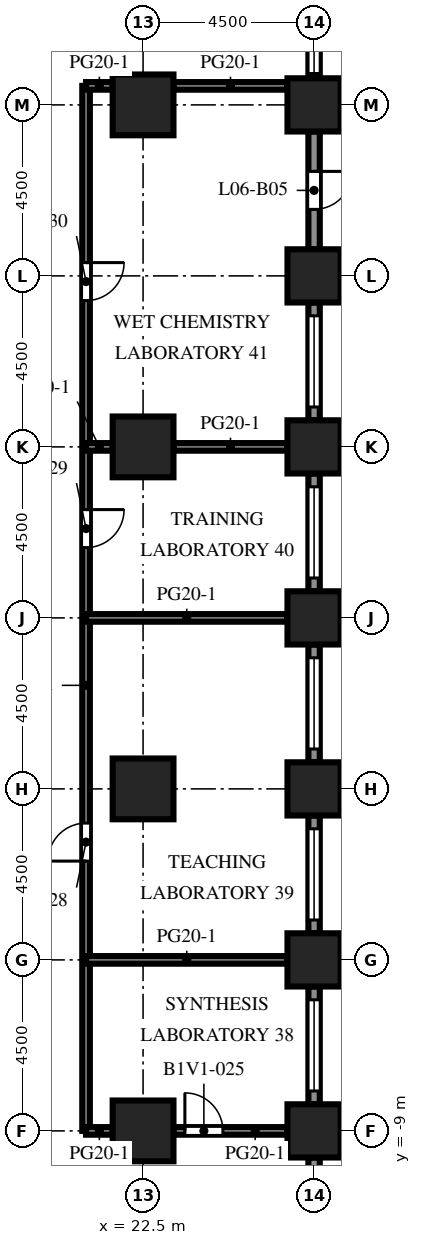
"""IFC4 building model, lengths in metres.
Left out: names, types, materials, properties, quantities, classifications, styles, units other than length and angle.
Written with IfcOpenShell. Run it as: python <this file> out.ifc"""

import sys

from ifc_helpers import new_model, si_unit, direction, frame, frame_2d, origin, origin_2d, place, context, subcontext, project, spatial, rectangle, extrude, element, fill, save


model = new_model("IFC4")
c1 = context("Model", 3, precision=1e-05, world=origin(), true_north=direction((0.0, 1.0)))
c2 = subcontext(c1, "Body", "Model", "MODEL_VIEW")
j1 = project(units=[si_unit("LENGTHUNIT", "METRE"), si_unit("PLANEANGLEUNIT", "RADIAN")], contexts=[c1])
p1 = place(None, origin())
s1 = spatial("IfcSite", under=j1, at=p1, CompositionType="ELEMENT")
p2 = place(p1, origin())
s2 = spatial("IfcBuilding", under=s1, at=p2, CompositionType="ELEMENT")
p3 = place(p2, frame((0.0, 0.0, 27.7)))
s3 = spatial("IfcBuildingStorey", under=s2, at=p3, CompositionType="ELEMENT", Elevation=27.7)
for number, where, z_axis, x_axis in (
    (1, (27.0, -9.0, 0.0), (0.0, 0.0, 1.0), (1.0, 0.0, 0.0)),
    (2, (27.0, -4.5, 0.0), (0.0, 0.0, 1.0), (1.0, 0.0, 0.0)),
    (3, (27.0, 0.0, 0.0), (0.0, 0.0, 1.0), (1.0, 0.0, 0.0)),
    (4, (27.0, 4.5, 0.0), (0.0, 0.0, 1.0), (1.0, 0.0, 0.0)),
    (5, (27.0, 9.0, 0.0), (0.0, 0.0, 1.0), (1.0, 0.0, 0.0)),
    (6, (27.0, 13.5, 0.0), (0.0, 0.0, 1.0), (1.0, 0.0, 0.0)),
    (7, (27.0, 18.0, 0.0), (0.0, 0.0, 1.0), (1.0, 0.0, 0.0)),
):
    element("IfcColumn", number, at=place(p3, frame(where, z_axis=z_axis, x_axis=x_axis)), inside=s3, PredefinedType="COLUMN", context=c2, shape_type="SweptSolid", body=[
        extrude(rectangle(XDim=1.4, YDim=1.4, at=origin_2d()), origin(), (0.0, 0.0, 1.0), 4.1),
    ])
for number, where, z_axis, x_axis in (
    (8, (22.5, -9.0, 0.0), (0.0, 0.0, 1.0), (1.0, 0.0, 0.0)),
    (9, (22.5, 0.0, 0.0), (0.0, 0.0, 1.0), (1.0, 0.0, 0.0)),
    (10, (22.5, 9.0, 0.0), (0.0, 0.0, 1.0), (1.0, 0.0, 0.0)),
    (11, (22.5, 18.0, 0.0), (0.0, 0.0, 1.0), (1.0, 0.0, 0.0)),
):
    element("IfcColumn", number, at=place(p3, frame(where, z_axis=z_axis, x_axis=x_axis)), inside=s3, PredefinedType="COLUMN", context=c2, shape_type="SweptSolid", body=[
        extrude(rectangle(XDim=1.6, YDim=1.6, at=origin_2d()), origin(), (0.0, 0.0, 1.0), 4.1),
    ])
p4 = place(p3, frame((27.0, -9.7, 0.0), z_axis=(0.0, 0.0, 1.0), x_axis=(0.0, -1.0, 0.0)))
e12 = element("IfcWall", 12, at=p4, inside=s3, PredefinedType="SOLIDWALL", context=c2, shape_type="SweptSolid", body=[
    extrude(rectangle(XDim=3.1, YDim=0.3, at=frame_2d((1.55, 0.0))), origin(), (0.0, 0.0, 1.0), 2.75),
])
p5 = place(p4, frame((0.475, 0.0, 0.8)))
e13 = element("IfcOpeningElement", 13, at=p5, cuts=e12, PredefinedType="OPENING", context=c2, shape_type="SweptSolid", body=[
    extrude(rectangle(XDim=1.2, YDim=1.7, at=frame_2d((0.6, 0.85))), frame((0.0, 0.16, 0.0), z_axis=(0.0, -1.0, 0.0), x_axis=(1.0, 0.0, 0.0)), (0.0, 0.0, 1.0), 0.32),
])
p6 = place(p3, frame((27.0, -5.2, 0.0), z_axis=(0.0, 0.0, 1.0), x_axis=(0.0, -1.0, 0.0)))
e14 = element("IfcWall", 14, at=p6, inside=s3, PredefinedType="SOLIDWALL", context=c2, shape_type="SweptSolid", body=[
    extrude(rectangle(XDim=3.1, YDim=0.3, at=frame_2d((1.55, 0.0))), origin(), (0.0, 0.0, 1.0), 2.75),
])
p7 = place(p6, frame((0.35, 0.0, 0.8)))
e15 = element("IfcOpeningElement", 15, at=p7, cuts=e14, PredefinedType="OPENING", context=c2, shape_type="SweptSolid", body=[
    extrude(rectangle(XDim=2.4, YDim=1.7, at=frame_2d((1.2, 0.85))), frame((0.0, 0.16, 0.0), z_axis=(0.0, -1.0, 0.0), x_axis=(1.0, 0.0, 0.0)), (0.0, 0.0, 1.0), 0.32),
])
p8 = place(p3, frame((27.0, -0.7, 0.0), z_axis=(0.0, 0.0, 1.0), x_axis=(0.0, -1.0, 0.0)))
e16 = element("IfcWall", 16, at=p8, inside=s3, PredefinedType="SOLIDWALL", context=c2, shape_type="SweptSolid", body=[
    extrude(rectangle(XDim=3.1, YDim=0.3, at=frame_2d((1.55, 0.0))), origin(), (0.0, 0.0, 1.0), 2.75),
])
p9 = place(p8, frame((0.35, 0.0, 0.8)))
e17 = element("IfcOpeningElement", 17, at=p9, cuts=e16, PredefinedType="OPENING", context=c2, shape_type="SweptSolid", body=[
    extrude(rectangle(XDim=2.4, YDim=1.7, at=frame_2d((1.2, 0.85))), frame((0.0, 0.16, 0.0), z_axis=(0.0, -1.0, 0.0), x_axis=(1.0, 0.0, 0.0)), (0.0, 0.0, 1.0), 0.32),
])
p10 = place(p3, frame((27.0, 3.8, 0.0), z_axis=(0.0, 0.0, 1.0), x_axis=(0.0, -1.0, 0.0)))
e18 = element("IfcWall", 18, at=p10, inside=s3, PredefinedType="SOLIDWALL", context=c2, shape_type="SweptSolid", body=[
    extrude(rectangle(XDim=3.1, YDim=0.3, at=frame_2d((1.55, 0.0))), origin(), (0.0, 0.0, 1.0), 2.75),
])
p11 = place(p10, frame((0.35, 0.0, 0.8)))
e19 = element("IfcOpeningElement", 19, at=p11, cuts=e18, PredefinedType="OPENING", context=c2, shape_type="SweptSolid", body=[
    extrude(rectangle(XDim=2.4, YDim=1.7, at=frame_2d((1.2, 0.85))), frame((0.0, 0.16, 0.0), z_axis=(0.0, -1.0, 0.0), x_axis=(1.0, 0.0, 0.0)), (0.0, 0.0, 1.0), 0.32),
])
p12 = place(p3, frame((27.0, 8.3, 0.0), z_axis=(0.0, 0.0, 1.0), x_axis=(0.0, -1.0, 0.0)))
e20 = element("IfcWall", 20, at=p12, inside=s3, PredefinedType="SOLIDWALL", context=c2, shape_type="SweptSolid", body=[
    extrude(rectangle(XDim=3.1, YDim=0.3, at=frame_2d((1.55, 0.0))), origin(), (0.0, 0.0, 1.0), 2.75),
])
p13 = place(p12, frame((0.35, 0.0, 0.8)))
e21 = element("IfcOpeningElement", 21, at=p13, cuts=e20, PredefinedType="OPENING", context=c2, shape_type="SweptSolid", body=[
    extrude(rectangle(XDim=2.4, YDim=1.7, at=frame_2d((1.2, 0.85))), frame((0.0, 0.16, 0.0), z_axis=(0.0, -1.0, 0.0), x_axis=(1.0, 0.0, 0.0)), (0.0, 0.0, 1.0), 0.32),
])
p14 = place(p3, frame((27.0, 12.8, 0.0), z_axis=(0.0, 0.0, 1.0), x_axis=(0.0, -1.0, 0.0)))
e22 = element("IfcWall", 22, at=p14, inside=s3, PredefinedType="SOLIDWALL", context=c2, shape_type="SweptSolid", body=[
    extrude(rectangle(XDim=3.1, YDim=0.3, at=frame_2d((1.55, 0.0))), origin(), (0.0, 0.0, 1.0), 2.75),
])
p15 = place(p14, frame((0.35, 0.0, 0.8)))
e23 = element("IfcOpeningElement", 23, at=p15, cuts=e22, PredefinedType="OPENING", context=c2, shape_type="SweptSolid", body=[
    extrude(rectangle(XDim=2.4, YDim=1.7, at=frame_2d((1.2, 0.85))), frame((0.0, 0.16, 0.0), z_axis=(0.0, -1.0, 0.0), x_axis=(1.0, 0.0, 0.0)), (0.0, 0.0, 1.0), 0.32),
])
p16 = place(p3, frame((27.0, 17.3, 0.0), z_axis=(0.0, 0.0, 1.0), x_axis=(0.0, -1.0, 0.0)))
e24 = element("IfcWall", 24, at=p16, inside=s3, PredefinedType="SOLIDWALL", context=c2, shape_type="SweptSolid", body=[
    extrude(rectangle(XDim=3.1, YDim=0.3, at=frame_2d((1.55, 0.0))), origin(), (0.0, 0.0, 1.0), 2.75),
])
p17 = place(p16, frame((1.05, 0.0, 0.0)))
e25 = element("IfcOpeningElement", 25, at=p17, cuts=e24, PredefinedType="OPENING", context=c2, shape_type="SweptSolid", body=[
    extrude(rectangle(XDim=1.0, YDim=2.2, at=frame_2d((0.5, 1.1))), frame((0.0, 0.16, 0.0), z_axis=(0.0, -1.0, 0.0), x_axis=(1.0, 0.0, 0.0)), (0.0, 0.0, 1.0), 0.32),
])
p18 = place(p3, frame((27.0, 21.8, 0.0), z_axis=(0.0, 0.0, 1.0), x_axis=(0.0, -1.0, 0.0)))
e26 = element("IfcWall", 26, at=p18, inside=s3, PredefinedType="SOLIDWALL", context=c2, shape_type="SweptSolid", body=[
    extrude(rectangle(XDim=3.1, YDim=0.3, at=frame_2d((1.55, 0.0))), origin(), (0.0, 0.0, 1.0), 2.75),
])
p19 = place(p18, frame((0.575, 0.0, 0.8)))
e27 = element("IfcOpeningElement", 27, at=p19, cuts=e26, PredefinedType="OPENING", context=c2, shape_type="SweptSolid", body=[
    extrude(rectangle(XDim=2.4, YDim=1.7, at=frame_2d((1.2, 0.85))), frame((0.0, 0.16, 0.0), z_axis=(0.0, -1.0, 0.0), x_axis=(1.0, 0.0, 0.0)), (0.0, 0.0, 1.0), 0.32),
])
p20 = place(p3, frame((21.0, 18.5, 0.0), z_axis=(0.0, 0.0, 1.0), x_axis=(0.0, -1.0, 0.0)))
e28 = element("IfcWall", 28, at=p20, inside=s3, PredefinedType="PARTITIONING", context=c2, shape_type="SweptSolid", body=[
    extrude(rectangle(XDim=27.5, YDim=0.2, at=frame_2d((13.75, 0.0))), origin(), (0.0, 0.0, 1.0), 3.65),
])
p21 = place(p20, frame((19.4, 0.0, 0.0)))
e29 = element("IfcOpeningElement", 29, at=p21, cuts=e28, PredefinedType="OPENING", context=c2, shape_type="SweptSolid", body=[
    extrude(rectangle(XDim=1.0, YDim=2.1, at=frame_2d((0.5, 1.05))), frame((0.0, 0.11, 0.0), z_axis=(0.0, -1.0, 0.0), x_axis=(1.0, 0.0, 0.0)), (0.0, 0.0, 1.0), 0.22),
])
p22 = place(p20, frame((11.15, 0.0, 0.0)))
e30 = element("IfcOpeningElement", 30, at=p22, cuts=e28, PredefinedType="OPENING", context=c2, shape_type="SweptSolid", body=[
    extrude(rectangle(XDim=1.0, YDim=2.1, at=frame_2d((0.5, 1.05))), frame((0.0, 0.11, 0.0), z_axis=(0.0, -1.0, 0.0), x_axis=(1.0, 0.0, 0.0)), (0.0, 0.0, 1.0), 0.22),
])
p23 = place(p20, frame((4.65, 0.0, 0.0)))
e31 = element("IfcOpeningElement", 31, at=p23, cuts=e28, PredefinedType="OPENING", context=c2, shape_type="SweptSolid", body=[
    extrude(rectangle(XDim=1.0, YDim=2.1, at=frame_2d((0.5, 1.05))), frame((0.0, 0.11, 0.0), z_axis=(0.0, -1.0, 0.0), x_axis=(1.0, 0.0, 0.0)), (0.0, 0.0, 1.0), 0.22),
])
p24 = place(p3, frame((21.0, -9.0, 0.0), z_axis=(0.0, 0.0, 1.0), x_axis=(1.0, 0.0, 0.0)))
e32 = element("IfcWall", 32, at=p24, inside=s3, PredefinedType="PARTITIONING", context=c2, shape_type="SweptSolid", body=[
    extrude(rectangle(XDim=0.7, YDim=0.2, at=frame_2d((0.35, 0.0))), origin(), (0.0, 0.0, 1.0), 3.65),
])
p25 = place(p3, frame((23.3, -9.0, 0.0), z_axis=(0.0, 0.0, 1.0), x_axis=(1.0, 0.0, 0.0)))
e33 = element("IfcWall", 33, at=p25, inside=s3, PredefinedType="PARTITIONING", context=c2, shape_type="SweptSolid", body=[
    extrude(rectangle(XDim=3.0, YDim=0.2, at=frame_2d((1.5, 0.0))), origin(), (0.0, 0.0, 1.0), 3.65),
])
p26 = place(p25, frame((0.3, 0.0, 0.0)))
e34 = element("IfcOpeningElement", 34, at=p26, cuts=e33, PredefinedType="OPENING", context=c2, shape_type="SweptSolid", body=[
    extrude(rectangle(XDim=1.0, YDim=2.1, at=frame_2d((0.5, 1.05))), frame((0.0, 0.11, 0.0), z_axis=(0.0, -1.0, 0.0), x_axis=(1.0, 0.0, 0.0)), (0.0, 0.0, 1.0), 0.22),
])
for number, where, z_axis, x_axis in (
    (35, (21.0, -4.5, 0.0), (0.0, 0.0, 1.0), (1.0, 0.0, 0.0)),
    (36, (21.0, 4.5, 0.0), (0.0, 0.0, 1.0), (1.0, 0.0, 0.0)),
):
    element("IfcWall", number, at=place(p3, frame(where, z_axis=z_axis, x_axis=x_axis)), inside=s3, PredefinedType="PARTITIONING", context=c2, shape_type="SweptSolid", body=[
        extrude(rectangle(XDim=5.3, YDim=0.2, at=frame_2d((2.65, 0.0))), origin(), (0.0, 0.0, 1.0), 3.65),
    ])
p27 = place(p3, frame((21.0, 9.0, 0.0), z_axis=(0.0, 0.0, 1.0), x_axis=(1.0, 0.0, 0.0)))
e37 = element("IfcWall", 37, at=p27, inside=s3, PredefinedType="PARTITIONING", context=c2, shape_type="SweptSolid", body=[
    extrude(rectangle(XDim=0.7, YDim=0.2, at=frame_2d((0.35, 0.0))), origin(), (0.0, 0.0, 1.0), 3.65),
])
p28 = place(p3, frame((23.3, 9.0, 0.0), z_axis=(0.0, 0.0, 1.0), x_axis=(1.0, 0.0, 0.0)))
e38 = element("IfcWall", 38, at=p28, inside=s3, PredefinedType="PARTITIONING", context=c2, shape_type="SweptSolid", body=[
    extrude(rectangle(XDim=3.0, YDim=0.2, at=frame_2d((1.5, 0.0))), origin(), (0.0, 0.0, 1.0), 3.65),
])
p29 = place(p3, frame((21.0, 18.5, 0.0), z_axis=(0.0, 0.0, 1.0), x_axis=(1.0, 0.0, 0.0)))
e39 = element("IfcWall", 39, at=p29, inside=s3, PredefinedType="PARTITIONING", context=c2, shape_type="SweptSolid", body=[
    extrude(rectangle(XDim=0.7, YDim=0.2, at=frame_2d((0.35, 0.0))), origin(), (0.0, 0.0, 1.0), 3.65),
])
p30 = place(p3, frame((23.3, 18.5, 0.0), z_axis=(0.0, 0.0, 1.0), x_axis=(1.0, 0.0, 0.0)))
e40 = element("IfcWall", 40, at=p30, inside=s3, PredefinedType="PARTITIONING", context=c2, shape_type="SweptSolid", body=[
    extrude(rectangle(XDim=3.0, YDim=0.2, at=frame_2d((1.5, 0.0))), origin(), (0.0, 0.0, 1.0), 3.65),
])
p31 = place(p7, origin())
e41 = element("IfcWindow", 41, at=p31, inside=s3, PartitioningType="SINGLE_PANEL", PredefinedType="WINDOW", context=c2, shape_type="SweptSolid", body=[
    extrude(rectangle(XDim=2.4, YDim=1.7, at=frame_2d((1.2, 0.85))), frame((0.0, 0.03, 0.0), z_axis=(0.0, -1.0, 0.0), x_axis=(1.0, 0.0, 0.0)), (0.0, 0.0, 1.0), 0.06),
])
fill(e15, e41)
p32 = place(p9, origin())
e42 = element("IfcWindow", 42, at=p32, inside=s3, PartitioningType="SINGLE_PANEL", PredefinedType="WINDOW", context=c2, shape_type="SweptSolid", body=[
    extrude(rectangle(XDim=2.4, YDim=1.7, at=frame_2d((1.2, 0.85))), frame((0.0, 0.03, 0.0), z_axis=(0.0, -1.0, 0.0), x_axis=(1.0, 0.0, 0.0)), (0.0, 0.0, 1.0), 0.06),
])
fill(e17, e42)
p33 = place(p11, origin())
e43 = element("IfcWindow", 43, at=p33, inside=s3, PartitioningType="SINGLE_PANEL", PredefinedType="WINDOW", context=c2, shape_type="SweptSolid", body=[
    extrude(rectangle(XDim=2.4, YDim=1.7, at=frame_2d((1.2, 0.85))), frame((0.0, 0.03, 0.0), z_axis=(0.0, -1.0, 0.0), x_axis=(1.0, 0.0, 0.0)), (0.0, 0.0, 1.0), 0.06),
])
fill(e19, e43)
p34 = place(p13, origin())
e44 = element("IfcWindow", 44, at=p34, inside=s3, PartitioningType="SINGLE_PANEL", PredefinedType="WINDOW", context=c2, shape_type="SweptSolid", body=[
    extrude(rectangle(XDim=2.4, YDim=1.7, at=frame_2d((1.2, 0.85))), frame((0.0, 0.03, 0.0), z_axis=(0.0, -1.0, 0.0), x_axis=(1.0, 0.0, 0.0)), (0.0, 0.0, 1.0), 0.06),
])
fill(e21, e44)
p35 = place(p15, origin())
e45 = element("IfcWindow", 45, at=p35, inside=s3, PartitioningType="SINGLE_PANEL", PredefinedType="WINDOW", context=c2, shape_type="SweptSolid", body=[
    extrude(rectangle(XDim=2.4, YDim=1.7, at=frame_2d((1.2, 0.85))), frame((0.0, 0.03, 0.0), z_axis=(0.0, -1.0, 0.0), x_axis=(1.0, 0.0, 0.0)), (0.0, 0.0, 1.0), 0.06),
])
fill(e23, e45)
p36 = place(p17, origin())
e46 = element("IfcDoor", 46, at=p36, inside=s3, OperationType="SINGLE_SWING_LEFT", PredefinedType="DOOR", context=c2, shape_type="SweptSolid", body=[
    extrude(rectangle(XDim=1.0, YDim=2.2, at=frame_2d((0.5, 1.1))), frame((0.0, 0.025, 0.0), z_axis=(0.0, -1.0, 0.0), x_axis=(1.0, 0.0, 0.0)), (0.0, 0.0, 1.0), 0.05),
])
fill(e25, e46)
p37 = place(p19, origin())
e47 = element("IfcWindow", 47, at=p37, inside=s3, PartitioningType="SINGLE_PANEL", PredefinedType="WINDOW", context=c2, shape_type="SweptSolid", body=[
    extrude(rectangle(XDim=2.4, YDim=1.7, at=frame_2d((1.2, 0.85))), frame((0.0, 0.03, 0.0), z_axis=(0.0, -1.0, 0.0), x_axis=(1.0, 0.0, 0.0)), (0.0, 0.0, 1.0), 0.06),
])
fill(e27, e47)
p38 = place(p26, origin())
e48 = element("IfcDoor", 48, at=p38, inside=s3, OperationType="SINGLE_SWING_LEFT", PredefinedType="DOOR", context=c2, shape_type="SweptSolid", body=[
    extrude(rectangle(XDim=1.0, YDim=2.1, at=frame_2d((0.5, 1.05))), frame((0.0, 0.025, 0.0), z_axis=(0.0, -1.0, 0.0), x_axis=(1.0, 0.0, 0.0)), (0.0, 0.0, 1.0), 0.05),
])
fill(e34, e48)
p39 = place(p21, origin())
e49 = element("IfcDoor", 49, at=p39, inside=s3, OperationType="SINGLE_SWING_RIGHT", PredefinedType="DOOR", context=c2, shape_type="SweptSolid", body=[
    extrude(rectangle(XDim=1.0, YDim=2.1, at=frame_2d((0.5, 1.05))), frame((0.0, 0.025, 0.0), z_axis=(0.0, -1.0, 0.0), x_axis=(1.0, 0.0, 0.0)), (0.0, 0.0, 1.0), 0.05),
])
fill(e29, e49)
p40 = place(p22, origin())
e50 = element("IfcDoor", 50, at=p40, inside=s3, OperationType="SINGLE_SWING_LEFT", PredefinedType="DOOR", context=c2, shape_type="SweptSolid", body=[
    extrude(rectangle(XDim=1.0, YDim=2.1, at=frame_2d((0.5, 1.05))), frame((0.0, 0.025, 0.0), z_axis=(0.0, -1.0, 0.0), x_axis=(1.0, 0.0, 0.0)), (0.0, 0.0, 1.0), 0.05),
])
fill(e30, e50)
p41 = place(p23, origin())
e51 = element("IfcDoor", 51, at=p41, inside=s3, OperationType="SINGLE_SWING_LEFT", PredefinedType="DOOR", context=c2, shape_type="SweptSolid", body=[
    extrude(rectangle(XDim=1.0, YDim=2.1, at=frame_2d((0.5, 1.05))), frame((0.0, 0.025, 0.0), z_axis=(0.0, -1.0, 0.0), x_axis=(1.0, 0.0, 0.0)), (0.0, 0.0, 1.0), 0.05),
])
fill(e31, e51)
save(model, sys.argv[1])
